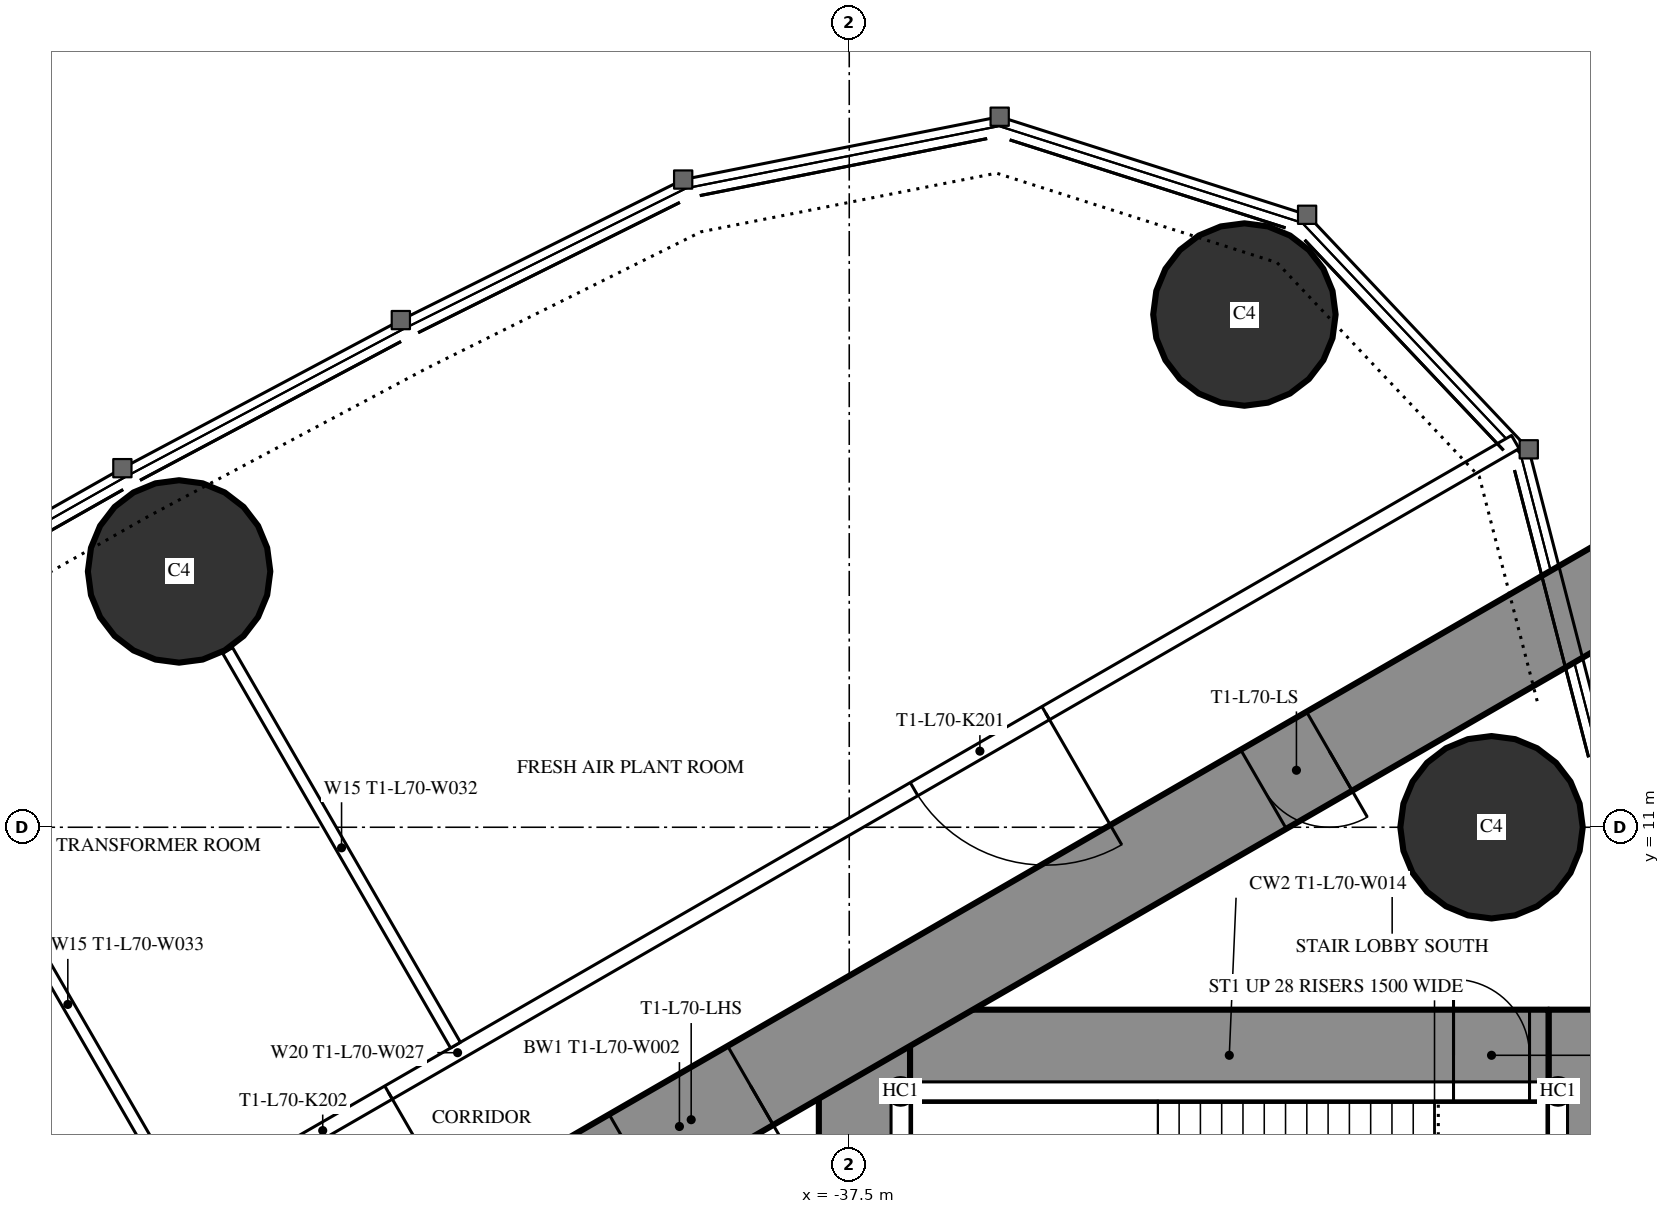
"""IFC4 building model, lengths in metres.
Left out: names, types, materials, properties, quantities, classifications, styles, units other than length and angle.
Written with IfcOpenShell. Run it as: python <this file> out.ifc"""

import sys

from ifc_helpers import new_model, si_unit, direction, frame, frame_2d, origin, origin_2d, place, context, subcontext, project, spatial, rectangle, circle, hollow_circle, extrude, element, fill, save


model = new_model("IFC4")
c1 = context("Model", 3, precision=1e-05, world=origin(), true_north=direction((0.0, 1.0)))
c2 = subcontext(c1, "Body", "Model", "MODEL_VIEW")
j1 = project(units=[si_unit("LENGTHUNIT", "METRE"), si_unit("PLANEANGLEUNIT", "RADIAN")], contexts=[c1])
p1 = place(None, origin())
s1 = spatial("IfcSite", under=j1, at=p1, CompositionType="ELEMENT")
p2 = place(p1, origin())
s2 = spatial("IfcBuilding", under=s1, at=p2, CompositionType="ELEMENT")
p3 = place(p2, frame((0.0, 0.0, 268.3)))
s3 = spatial("IfcBuildingStorey", under=s2, at=p3, CompositionType="ELEMENT", Elevation=268.3)
for number, where, z_axis, x_axis in (
    (1, (-32.301, 17.745, 0.0), (0.0, 0.0, 1.0), (1.0, 0.0, 0.0)),
    (2, (-29.05, 11.0, 0.0), (0.0, 0.0, 1.0), (1.0, 0.0, 0.0)),
    (3, (-46.317, 14.365, 0.0), (0.0, 0.0, 1.0), (1.0, 0.0, 0.0)),
):
    element("IfcColumn", number, at=place(p3, frame(where, z_axis=z_axis, x_axis=x_axis)), inside=s3, PredefinedType="COLUMN", context=c2, shape_type="SweptSolid", body=[
        extrude(circle(Radius=1.2, at=origin_2d()), origin(), (0.0, 0.0, 1.0), 5.0),
    ])
p4 = place(p3, frame((-27.9, 8.6, 0.0), z_axis=(0.0, 0.0, 1.0), x_axis=(0.0, -1.0, 0.0)))
e4 = element("IfcWall", 4, at=p4, inside=s3, PredefinedType="SHEAR", context=c2, shape_type="SweptSolid", body=[
    extrude(rectangle(XDim=17.2, YDim=0.8, at=frame_2d((8.6, 0.0))), origin(), (0.0, 0.0, 1.0), 5.0),
])
p5 = place(p4, frame((6.95, 0.0, 0.0)))
e5 = element("IfcOpeningElement", 5, at=p5, cuts=e4, PredefinedType="OPENING", context=c2, shape_type="SweptSolid", body=[
    extrude(rectangle(XDim=0.9, YDim=2.2, at=frame_2d((0.45, 1.1))), frame((0.0, 0.41, 0.0), z_axis=(0.0, -1.0, 0.0), x_axis=(1.0, 0.0, 0.0)), (0.0, 0.0, 1.0), 0.82),
])
p6 = place(p3, frame((-37.3, 8.6, 0.0), z_axis=(0.0, 0.0, 1.0), x_axis=(0.0, -1.0, 0.0)))
e6 = element("IfcWall", 6, at=p6, inside=s3, PredefinedType="SHEAR", context=c2, shape_type="SweptSolid", body=[
    extrude(rectangle(XDim=17.2, YDim=1.2, at=frame_2d((8.6, 0.0))), origin(), (0.0, 0.0, 1.0), 5.0),
])
p7 = place(p6, frame((7.7, 0.0, 0.0)))
e7 = element("IfcOpeningElement", 7, at=p7, cuts=e6, PredefinedType="OPENING", context=c2, shape_type="SweptSolid", body=[
    extrude(rectangle(XDim=1.8, YDim=2.2, at=frame_2d((0.9, 1.1))), frame((0.0, 0.61, 0.0), z_axis=(0.0, -1.0, 0.0), x_axis=(1.0, 0.0, 0.0)), (0.0, 0.0, 1.0), 1.22),
])
p8 = place(p3, frame((-28.3, 8.0, 0.0), z_axis=(0.0, 0.0, 1.0), x_axis=(-1.0, 0.0, 0.0)))
e8 = element("IfcWall", 8, at=p8, inside=s3, PredefinedType="SHEAR", context=c2, shape_type="SweptSolid", body=[
    extrude(rectangle(XDim=8.4, YDim=1.2, at=frame_2d((4.2, 0.0))), origin(), (0.0, 0.0, 1.0), 5.0),
])
p9 = place(p8, frame((0.25, 0.0, 0.0)))
e9 = element("IfcOpeningElement", 9, at=p9, cuts=e8, PredefinedType="OPENING", context=c2, shape_type="SweptSolid", body=[
    extrude(rectangle(XDim=1.0, YDim=2.2, at=frame_2d((0.5, 1.1))), frame((0.0, 0.61, 0.0), z_axis=(0.0, -1.0, 0.0), x_axis=(1.0, 0.0, 0.0)), (0.0, 0.0, 1.0), 1.22),
])
p10 = place(p3, frame((-27.2, 14.3, 0.0), z_axis=(0.0, 0.0, 1.0), x_axis=(-0.866026593062, -0.499997940104, 0.0)))
e10 = element("IfcWall", 10, at=p10, inside=s3, PredefinedType="SHEAR", context=c2, shape_type="SweptSolid", body=[
    extrude(rectangle(XDim=28.946, YDim=1.2, at=frame_2d((14.473, 0.0))), origin(), (0.0, 0.0, 1.0), 5.0),
])
p11 = place(p10, frame((4.6, 0.0, 0.0)))
e11 = element("IfcOpeningElement", 11, at=p11, cuts=e10, PredefinedType="OPENING", context=c2, shape_type="SweptSolid", body=[
    extrude(rectangle(XDim=1.0, YDim=2.2, at=frame_2d((0.5, 1.1))), frame((0.0, 0.61, 0.0), z_axis=(0.0, -1.0, 0.0), x_axis=(1.0, 0.0, 0.0)), (0.0, 0.0, 1.0), 1.22),
])
p12 = place(p10, frame((13.395, 0.0, 0.0)))
e12 = element("IfcOpeningElement", 12, at=p12, cuts=e10, PredefinedType="OPENING", context=c2, shape_type="SweptSolid", body=[
    extrude(rectangle(XDim=1.8, YDim=2.2, at=frame_2d((0.9, 1.1))), frame((0.0, 0.61, 0.0), z_axis=(0.0, -1.0, 0.0), x_axis=(1.0, 0.0, 0.0)), (0.0, 0.0, 1.0), 1.22),
])
for number, where, z_axis, x_axis in (
    (13, (-28.175, 7.525, 5.0), (0.0, 0.0, 1.0), (1.0, 0.0, 0.0)),
    (14, (-36.825, 7.525, 5.0), (0.0, 0.0, 1.0), (1.0, 0.0, 0.0)),
):
    element("IfcColumn", number, at=place(p3, frame(where, z_axis=z_axis, x_axis=x_axis)), inside=s3, PredefinedType="COLUMN", context=c2, shape_type="SweptSolid", body=[
        extrude(hollow_circle(Radius=0.162, WallThickness=0.012, at=origin_2d()), origin(), (0.0, 0.0, 1.0), 3.0),
    ])
for number, where, z_axis, x_axis in (
    (15, (-28.175, 7.422, 5.0), (0.0, 0.0, 1.0), (0.0, -1.0, 0.0)),
    (16, (-36.825, 7.422, 5.0), (0.0, 0.0, 1.0), (0.0, -1.0, 0.0)),
):
    element("IfcWall", number, at=place(p3, frame(where, z_axis=z_axis, x_axis=x_axis)), inside=s3, PredefinedType="SOLIDWALL", context=c2, shape_type="SweptSolid", body=[
        extrude(rectangle(XDim=3.144, YDim=0.25, at=frame_2d((1.572, 0.0))), origin(), (0.0, 0.0, 1.0), 2.54),
    ])
p13 = place(p3, frame((-28.278, 7.525, 5.0), z_axis=(0.0, 0.0, 1.0), x_axis=(-1.0, 0.0, 0.0)))
e17 = element("IfcWall", 17, at=p13, inside=s3, PredefinedType="SOLIDWALL", context=c2, shape_type="SweptSolid", body=[
    extrude(rectangle(XDim=8.444, YDim=0.25, at=frame_2d((4.222, 0.0))), origin(), (0.0, 0.0, 1.0), 2.54),
])
p14 = place(p3, frame((-28.737, 16.068, 0.0), z_axis=(0.0, 0.0, 1.0), x_axis=(-0.866026057212, -0.499998868229, 0.0)))
e18 = element("IfcWall", 18, at=p14, inside=s3, PredefinedType="PARTITIONING", context=c2, shape_type="SweptSolid", body=[
    extrude(rectangle(XDim=32.137, YDim=0.2, at=frame_2d((16.068, 0.0))), origin(), (0.0, 0.0, 1.0), 4.7),
])
p15 = place(p14, frame((7.134, 0.0, 0.0)))
e19 = element("IfcOpeningElement", 19, at=p15, cuts=e18, PredefinedType="OPENING", context=c2, shape_type="SweptSolid", body=[
    extrude(rectangle(XDim=2.0, YDim=2.4, at=frame_2d((1.0, 1.2))), frame((0.0, 0.11, 0.0), z_axis=(0.0, -1.0, 0.0), x_axis=(1.0, 0.0, 0.0)), (0.0, 0.0, 1.0), 0.22),
])
p16 = place(p14, frame((17.117, 0.0, 0.0)))
e20 = element("IfcOpeningElement", 20, at=p16, cuts=e18, PredefinedType="OPENING", context=c2, shape_type="SweptSolid", body=[
    extrude(rectangle(XDim=2.0, YDim=2.4, at=frame_2d((1.0, 1.2))), frame((0.0, 0.11, 0.0), z_axis=(0.0, -1.0, 0.0), x_axis=(1.0, 0.0, 0.0)), (0.0, 0.0, 1.0), 0.22),
])
p17 = place(p14, frame((21.266, 0.0, 0.0)))
e21 = element("IfcOpeningElement", 21, at=p17, cuts=e18, PredefinedType="OPENING", context=c2, shape_type="SweptSolid", body=[
    extrude(rectangle(XDim=2.0, YDim=2.4, at=frame_2d((1.0, 1.2))), frame((0.0, 0.11, 0.0), z_axis=(0.0, -1.0, 0.0), x_axis=(1.0, 0.0, 0.0)), (0.0, 0.0, 1.0), 0.22),
])
p18 = place(p14, frame((27.126, 0.0, 0.0)))
e22 = element("IfcOpeningElement", 22, at=p18, cuts=e18, PredefinedType="OPENING", context=c2, shape_type="SweptSolid", body=[
    extrude(rectangle(XDim=2.0, YDim=2.4, at=frame_2d((1.0, 1.2))), frame((0.0, 0.11, 0.0), z_axis=(0.0, -1.0, 0.0), x_axis=(1.0, 0.0, 0.0)), (0.0, 0.0, 1.0), 0.22),
])
p19 = place(p3, frame((-42.68, 8.134, 0.0), z_axis=(0.0, 0.0, 1.0), x_axis=(-0.499984479505, 0.866034364361, 0.0)))
e23 = element("IfcWall", 23, at=p19, inside=s3, PredefinedType="PARTITIONING", context=c2, shape_type="SweptSolid", body=[
    extrude(rectangle(XDim=5.995, YDim=0.15, at=frame_2d((2.998, 0.0))), origin(), (0.0, 0.0, 1.0), 3.8),
])
p20 = place(p3, frame((-46.274, 6.059, 0.0), z_axis=(0.0, 0.0, 1.0), x_axis=(-0.500020471368, 0.866013584312, 0.0)))
e24 = element("IfcWall", 24, at=p20, inside=s3, PredefinedType="PARTITIONING", context=c2, shape_type="SweptSolid", body=[
    extrude(rectangle(XDim=6.028, YDim=0.15, at=frame_2d((3.014, 0.0))), origin(), (0.0, 0.0, 1.0), 3.8),
])
p21 = place(p15, origin())
e25 = element("IfcDoor", 25, at=p21, inside=s3, OperationType="DOUBLE_DOOR_SINGLE_SWING", PredefinedType="DOOR", context=c2, shape_type="SweptSolid", body=[
    extrude(rectangle(XDim=2.0, YDim=2.4, at=frame_2d((1.0, 1.2))), frame((0.0, 0.025, 0.0), z_axis=(0.0, -1.0, 0.0), x_axis=(1.0, 0.0, 0.0)), (0.0, 0.0, 1.0), 0.05),
])
fill(e19, e25)
p22 = place(p16, origin())
e26 = element("IfcDoor", 26, at=p22, inside=s3, OperationType="DOUBLE_DOOR_SINGLE_SWING", PredefinedType="DOOR", context=c2, shape_type="SweptSolid", body=[
    extrude(rectangle(XDim=2.0, YDim=2.4, at=frame_2d((1.0, 1.2))), frame((0.0, 0.025, 0.0), z_axis=(0.0, -1.0, 0.0), x_axis=(1.0, 0.0, 0.0)), (0.0, 0.0, 1.0), 0.05),
])
fill(e20, e26)
p23 = place(p11, origin())
e27 = element("IfcDoor", 27, at=p23, inside=s3, OperationType="SINGLE_SWING_LEFT", PredefinedType="DOOR", context=c2, shape_type="SweptSolid", body=[
    extrude(rectangle(XDim=1.0, YDim=2.2, at=frame_2d((0.5, 1.1))), frame((0.0, 0.025, 0.0), z_axis=(0.0, -1.0, 0.0), x_axis=(1.0, 0.0, 0.0)), (0.0, 0.0, 1.0), 0.05),
])
fill(e11, e27)
p24 = place(p12, origin())
e28 = element("IfcDoor", 28, at=p24, inside=s3, OperationType="DOUBLE_DOOR_SINGLE_SWING", PredefinedType="DOOR", context=c2, shape_type="SweptSolid", body=[
    extrude(rectangle(XDim=1.8, YDim=2.2, at=frame_2d((0.9, 1.1))), frame((0.0, 0.025, 0.0), z_axis=(0.0, -1.0, 0.0), x_axis=(1.0, 0.0, 0.0)), (0.0, 0.0, 1.0), 0.05),
])
fill(e12, e28)
p25 = place(p9, origin())
e29 = element("IfcDoor", 29, at=p25, inside=s3, OperationType="SINGLE_SWING_RIGHT", PredefinedType="DOOR", context=c2, shape_type="SweptSolid", body=[
    extrude(rectangle(XDim=1.0, YDim=2.2, at=frame_2d((0.5, 1.1))), frame((0.0, 0.025, 0.0), z_axis=(0.0, -1.0, 0.0), x_axis=(1.0, 0.0, 0.0)), (0.0, 0.0, 1.0), 0.05),
])
fill(e9, e29)
save(model, sys.argv[1])
